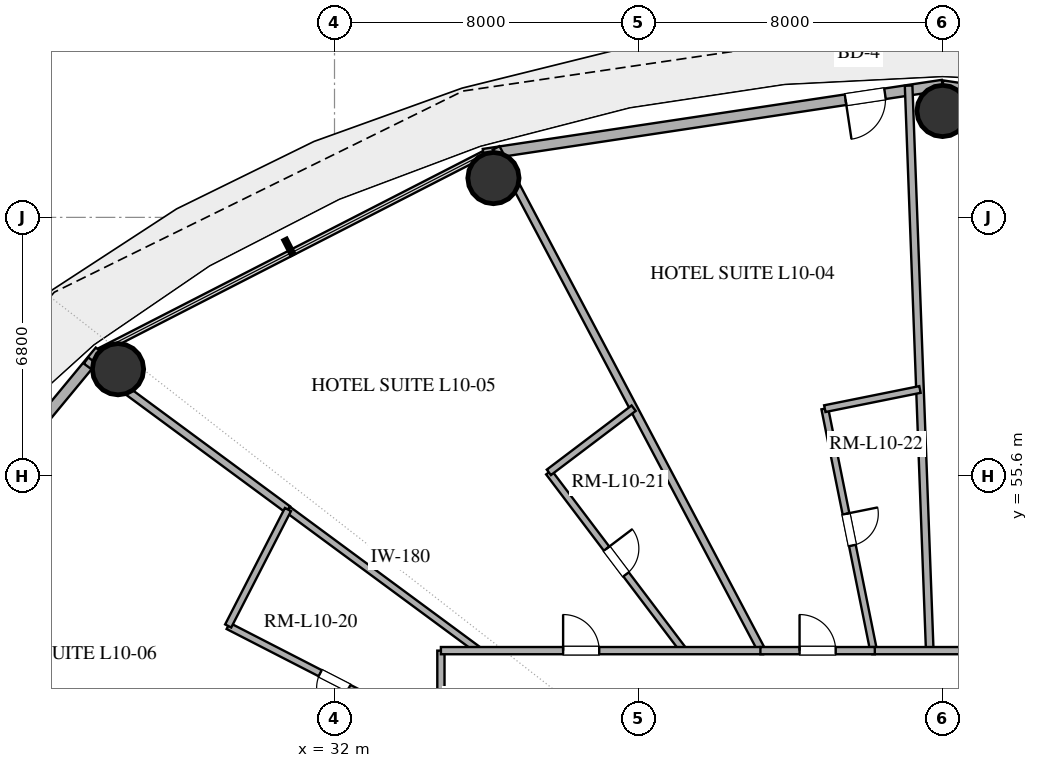
"""IFC4 building model, lengths in metres.
Left out: names, types, materials, properties, quantities, classifications, styles, units other than length and angle.
Written with IfcOpenShell. Run it as: python <this file> out.ifc"""

import sys

from ifc_helpers import new_model, si_unit, direction, frame, frame_2d, origin, origin_2d, place, context, subcontext, project, spatial, rectangle, hollow_circle, extrude, element, fill, save


model = new_model("IFC4")
c1 = context("Model", 3, precision=1e-05, world=origin(), true_north=direction((0.0, 1.0)))
c2 = subcontext(c1, "Body", "Model", "MODEL_VIEW")
j1 = project(units=[si_unit("LENGTHUNIT", "METRE"), si_unit("PLANEANGLEUNIT", "RADIAN")], contexts=[c1])
p1 = place(None, origin())
s1 = spatial("IfcSite", under=j1, at=p1, CompositionType="ELEMENT")
p2 = place(p1, origin())
s2 = spatial("IfcBuilding", under=s1, at=p2, CompositionType="ELEMENT")
p3 = place(p2, frame((0.0, 0.0, 46.2)))
s3 = spatial("IfcBuildingStorey", under=s2, at=p3, CompositionType="ELEMENT", Elevation=46.2)
for number, where, z_axis, x_axis in (
    (1, (48.0, 65.2, 0.0), (0.0, 0.0, 1.0), (1.0, 0.0, 0.0)),
    (2, (36.182, 63.434, 0.0), (0.0, 0.0, 1.0), (1.0, 0.0, 0.0)),
    (3, (26.303, 58.405, 0.0), (0.0, 0.0, 1.0), (1.0, 0.0, 0.0)),
):
    element("IfcColumn", number, at=place(p3, frame(where, z_axis=z_axis, x_axis=x_axis)), inside=s3, PredefinedType="COLUMN", context=c2, shape_type="SweptSolid", body=[
        extrude(hollow_circle(Radius=0.675, WallThickness=0.036, at=origin_2d()), origin(), (0.0, 0.0, 1.0), 3.38),
    ])
p4 = place(p3, frame((60.078, 64.062, 0.0), z_axis=(0.0, 0.0, 1.0), x_axis=(-0.988864835849, 0.148816452121, 0.0)))
e4 = element("IfcWall", 4, at=p4, inside=s3, PredefinedType="SOLIDWALL", context=c2, shape_type="SweptSolid", body=[
    extrude(rectangle(XDim=12.214, YDim=0.25, at=frame_2d((6.107, 0.0))), origin(), (0.0, 0.0, 1.0), 3.38),
])
p5 = place(p3, frame((48.0, 65.88, 0.0), z_axis=(0.0, 0.0, 1.0), x_axis=(-0.988864835849, -0.148816452121, 0.0)))
e5 = element("IfcWall", 5, at=p5, inside=s3, PredefinedType="SOLIDWALL", context=c2, shape_type="SweptSolid", body=[
    extrude(rectangle(XDim=12.214, YDim=0.28, at=frame_2d((6.107, 0.0))), origin(), (0.0, 0.0, 1.0), 3.38),
])
p6 = place(p5, frame((1.531, 0.0, 0.0)))
e6 = element("IfcOpeningElement", 6, at=p6, cuts=e5, PredefinedType="OPENING", context=c2, shape_type="SweptSolid", body=[
    extrude(rectangle(XDim=1.05, YDim=2.2, at=frame_2d((0.525, 1.1))), frame((0.0, 0.15, 0.0), z_axis=(0.0, -1.0, 0.0), x_axis=(1.0, 0.0, 0.0)), (0.0, 0.0, 1.0), 0.3),
])
p7 = place(p3, frame((25.826, 58.886, 0.0), z_axis=(0.0, 0.0, 1.0), x_axis=(-0.637296809613, -0.770618437657, 0.0)))
e7 = element("IfcWall", 7, at=p7, inside=s3, PredefinedType="SOLIDWALL", context=c2, shape_type="SweptSolid", body=[
    extrude(rectangle(XDim=10.053, YDim=0.28, at=frame_2d((5.027, 0.0))), origin(), (0.0, 0.0, 1.0), 3.38),
])
p8 = place(p7, frame((2.598, 0.0, 0.85)))
e8 = element("IfcOpeningElement", 8, at=p8, cuts=e7, PredefinedType="OPENING", context=c2, shape_type="SweptSolid", body=[
    extrude(rectangle(XDim=1.8, YDim=2.2, at=frame_2d((0.9, 1.1))), frame((0.0, 0.15, 0.0), z_axis=(0.0, -1.0, 0.0), x_axis=(1.0, 0.0, 0.0)), (0.0, 0.0, 1.0), 0.3),
])
p9 = place(p7, frame((5.53, 0.0, 0.85)))
e9 = element("IfcOpeningElement", 9, at=p9, cuts=e7, PredefinedType="OPENING", context=c2, shape_type="SweptSolid", body=[
    extrude(rectangle(XDim=1.8, YDim=2.2, at=frame_2d((0.9, 1.1))), frame((0.0, 0.15, 0.0), z_axis=(0.0, -1.0, 0.0), x_axis=(1.0, 0.0, 0.0)), (0.0, 0.0, 1.0), 0.3),
])
p10 = place(p3, frame((47.663, 51.0, 0.0), z_axis=(0.0, 0.0, 1.0), x_axis=(-0.037384345878, 0.999300961014, 0.0)))
e10 = element("IfcWall", 10, at=p10, inside=s3, PredefinedType="PARTITIONING", context=c2, shape_type="SweptSolid", body=[
    extrude(rectangle(XDim=14.877, YDim=0.2, at=frame_2d((7.438, 0.0))), origin(), (0.0, 0.0, 1.0), 2.74),
])
p11 = place(p3, frame((43.243, 51.0, 0.0), z_axis=(0.0, 0.0, 1.0), x_axis=(-0.467270516294, 0.884114395654, 0.0)))
e11 = element("IfcWall", 11, at=p11, inside=s3, PredefinedType="PARTITIONING", context=c2, shape_type="SweptSolid", body=[
    extrude(rectangle(XDim=14.96, YDim=0.2, at=frame_2d((7.48, 0.0))), origin(), (0.0, 0.0, 1.0), 2.74),
])
p12 = place(p3, frame((25.462, 58.634, 0.0), z_axis=(0.0, 0.0, 1.0), x_axis=(0.804616980297, -0.593794168898, 0.0)))
e12 = element("IfcWall", 12, at=p12, inside=s3, PredefinedType="PARTITIONING", context=c2, shape_type="SweptSolid", body=[
    extrude(rectangle(XDim=6.603, YDim=0.2, at=frame_2d((3.302, 0.0))), origin(), (0.0, 0.0, 1.0), 2.74),
])
p13 = place(p3, frame((44.902, 57.367, 0.0), z_axis=(0.0, 0.0, 1.0), x_axis=(0.197648412503, -0.980272974755, 0.0)))
e13 = element("IfcWall", 13, at=p13, inside=s3, PredefinedType="PLUMBINGWALL", context=c2, shape_type="SweptSolid", body=[
    extrude(rectangle(XDim=6.495, YDim=0.18, at=frame_2d((3.248, 0.0))), origin(), (0.0, 0.0, 1.0), 2.74),
])
p14 = place(p13, frame((2.823, 0.0, 0.0)))
e14 = element("IfcOpeningElement", 14, at=p14, cuts=e13, PredefinedType="OPENING", context=c2, shape_type="SweptSolid", body=[
    extrude(rectangle(XDim=0.85, YDim=2.1, at=frame_2d((0.425, 1.05))), frame((0.0, 0.1, 0.0), z_axis=(0.0, -1.0, 0.0), x_axis=(1.0, 0.0, 0.0)), (0.0, 0.0, 1.0), 0.2),
])
p15 = place(p3, frame((34.8, 48.776, 0.0), z_axis=(0.0, 0.0, 1.0), x_axis=(-0.889651376734, 0.456640370395, 0.0)))
e15 = element("IfcWall", 15, at=p15, inside=s3, PredefinedType="PLUMBINGWALL", context=c2, shape_type="SweptSolid", body=[
    extrude(rectangle(XDim=6.292, YDim=0.18, at=frame_2d((3.146, 0.0))), origin(), (0.0, 0.0, 1.0), 2.74),
])
p16 = place(p15, frame((2.721, 0.0, 0.0)))
e16 = element("IfcOpeningElement", 16, at=p16, cuts=e15, PredefinedType="OPENING", context=c2, shape_type="SweptSolid", body=[
    extrude(rectangle(XDim=0.85, YDim=2.1, at=frame_2d((0.425, 1.05))), frame((0.0, 0.1, 0.0), z_axis=(0.0, -1.0, 0.0), x_axis=(1.0, 0.0, 0.0)), (0.0, 0.0, 1.0), 0.2),
])
p17 = place(p3, frame((30.775, 54.713, 0.0), z_axis=(0.0, 0.0, 1.0), x_axis=(0.804582519588, -0.593840861825, 0.0)))
e17 = element("IfcWall", 17, at=p17, inside=s3, PredefinedType="PLUMBINGWALL", context=c2, shape_type="SweptSolid", body=[
    extrude(rectangle(XDim=6.252, YDim=0.18, at=frame_2d((3.126, 0.0))), origin(), (0.0, 0.0, 1.0), 2.74),
])
p18 = place(p3, frame((34.8, 36.017, 0.0), z_axis=(0.0, 0.0, 1.0), x_axis=(0.0, 1.0, 0.0)))
e18 = element("IfcWall", 18, at=p18, inside=s3, PredefinedType="PARTITIONING", context=c2, shape_type="SweptSolid", body=[
    extrude(rectangle(XDim=14.983, YDim=0.19, at=frame_2d((7.492, 0.0))), origin(), (0.0, 0.0, 1.0), 2.74),
])
p19 = place(p18, frame((4.963, 0.0, 0.0)))
e19 = element("IfcOpeningElement", 19, at=p19, cuts=e18, PredefinedType="OPENING", context=c2, shape_type="SweptSolid", body=[
    extrude(rectangle(XDim=1.0, YDim=2.2, at=frame_2d((0.5, 1.1))), frame((0.0, 0.105, 0.0), z_axis=(0.0, -1.0, 0.0), x_axis=(1.0, 0.0, 0.0)), (0.0, 0.0, 1.0), 0.21),
])
p20 = place(p18, frame((10.146, 0.0, 0.0)))
e20 = element("IfcOpeningElement", 20, at=p20, cuts=e18, PredefinedType="OPENING", context=c2, shape_type="SweptSolid", body=[
    extrude(rectangle(XDim=0.95, YDim=2.15, at=frame_2d((0.475, 1.075))), frame((0.0, 0.105, 0.0), z_axis=(0.0, -1.0, 0.0), x_axis=(1.0, 0.0, 0.0)), (0.0, 0.0, 1.0), 0.21),
])
p21 = place(p3, frame((37.64, 55.691, 0.0), z_axis=(0.0, 0.0, 1.0), x_axis=(0.603401299207, -0.797437691682, 0.0)))
e21 = element("IfcWall", 21, at=p21, inside=s3, PredefinedType="PLUMBINGWALL", context=c2, shape_type="SweptSolid", body=[
    extrude(rectangle(XDim=5.882, YDim=0.18, at=frame_2d((2.941, 0.0))), origin(), (0.0, 0.0, 1.0), 2.74),
])
p22 = place(p21, frame((2.516, 0.0, 0.0)))
e22 = element("IfcOpeningElement", 22, at=p22, cuts=e21, PredefinedType="OPENING", context=c2, shape_type="SweptSolid", body=[
    extrude(rectangle(XDim=0.85, YDim=2.1, at=frame_2d((0.425, 1.05))), frame((0.0, 0.1, 0.0), z_axis=(0.0, -1.0, 0.0), x_axis=(1.0, 0.0, 0.0)), (0.0, 0.0, 1.0), 0.2),
])
p23 = place(p3, frame((34.8, 51.0, 0.0), z_axis=(0.0, 0.0, 1.0), x_axis=(1.0, 0.0, 0.0)))
e23 = element("IfcWall", 23, at=p23, inside=s3, PredefinedType="PARTITIONING", context=c2, shape_type="SweptSolid", body=[
    extrude(rectangle(XDim=8.479, YDim=0.19, at=frame_2d((4.24, 0.0))), origin(), (0.0, 0.0, 1.0), 2.74),
])
p24 = place(p23, frame((3.216, 0.0, 0.0)))
e24 = element("IfcOpeningElement", 24, at=p24, cuts=e23, PredefinedType="OPENING", context=c2, shape_type="SweptSolid", body=[
    extrude(rectangle(XDim=0.95, YDim=2.15, at=frame_2d((0.475, 1.075))), frame((0.0, 0.105, 0.0), z_axis=(0.0, -1.0, 0.0), x_axis=(1.0, 0.0, 0.0)), (0.0, 0.0, 1.0), 0.21),
])
p25 = place(p3, frame((46.153, 51.0, 0.0), z_axis=(0.0, 0.0, 1.0), x_axis=(1.0, 0.0, 0.0)))
e25 = element("IfcWall", 25, at=p25, inside=s3, PredefinedType="PARTITIONING", context=c2, shape_type="SweptSolid", body=[
    extrude(rectangle(XDim=15.047, YDim=0.19, at=frame_2d((7.524, 0.0))), origin(), (0.0, 0.0, 1.0), 2.74),
])
p26 = place(p25, frame((3.144, 0.0, 0.0)))
e26 = element("IfcOpeningElement", 26, at=p26, cuts=e25, PredefinedType="OPENING", context=c2, shape_type="SweptSolid", body=[
    extrude(rectangle(XDim=1.0, YDim=2.2, at=frame_2d((0.5, 1.1))), frame((0.0, 0.105, 0.0), z_axis=(0.0, -1.0, 0.0), x_axis=(1.0, 0.0, 0.0)), (0.0, 0.0, 1.0), 0.21),
])
p27 = place(p25, frame((7.119, 0.0, 0.0)))
e27 = element("IfcOpeningElement", 27, at=p27, cuts=e25, PredefinedType="OPENING", context=c2, shape_type="SweptSolid", body=[
    extrude(rectangle(XDim=0.95, YDim=2.15, at=frame_2d((0.475, 1.075))), frame((0.0, 0.105, 0.0), z_axis=(0.0, -1.0, 0.0), x_axis=(1.0, 0.0, 0.0)), (0.0, 0.0, 1.0), 0.21),
])
p28 = place(p3, frame((29.202, 51.649, 0.0), z_axis=(0.0, 0.0, 1.0), x_axis=(0.456659133546, 0.889641745732, 0.0)))
e28 = element("IfcWall", 28, at=p28, inside=s3, PredefinedType="PLUMBINGWALL", context=c2, shape_type="SweptSolid", body=[
    extrude(rectangle(XDim=3.444, YDim=0.18, at=frame_2d((1.722, 0.0))), origin(), (0.0, 0.0, 1.0), 2.74),
])
p29 = place(p3, frame((43.207, 51.0, 0.0), z_axis=(0.0, 0.0, 1.0), x_axis=(1.0, 0.0, 0.0)))
e29 = element("IfcWall", 29, at=p29, inside=s3, PredefinedType="PARTITIONING", context=c2, shape_type="SweptSolid", body=[
    extrude(rectangle(XDim=3.011, YDim=0.19, at=frame_2d((1.505, 0.0))), origin(), (0.0, 0.0, 1.0), 2.74),
])
p30 = place(p29, frame((1.03, 0.0, 0.0)))
e30 = element("IfcOpeningElement", 30, at=p30, cuts=e29, PredefinedType="OPENING", context=c2, shape_type="SweptSolid", body=[
    extrude(rectangle(XDim=0.95, YDim=2.15, at=frame_2d((0.475, 1.075))), frame((0.0, 0.105, 0.0), z_axis=(0.0, -1.0, 0.0), x_axis=(1.0, 0.0, 0.0)), (0.0, 0.0, 1.0), 0.21),
])
p31 = place(p3, frame((39.872, 57.379, 0.0), z_axis=(0.0, 0.0, 1.0), x_axis=(-0.797438154909, -0.603400687019, 0.0)))
e31 = element("IfcWall", 31, at=p31, inside=s3, PredefinedType="PLUMBINGWALL", context=c2, shape_type="SweptSolid", body=[
    extrude(rectangle(XDim=2.798, YDim=0.18, at=frame_2d((1.399, 0.0))), origin(), (0.0, 0.0, 1.0), 2.74),
])
p32 = place(p3, frame((47.406, 57.872, 0.0), z_axis=(0.0, 0.0, 1.0), x_axis=(-0.980278128955, -0.1976228476, 0.0)))
e32 = element("IfcWall", 32, at=p32, inside=s3, PredefinedType="PLUMBINGWALL", context=c2, shape_type="SweptSolid", body=[
    extrude(rectangle(XDim=2.555, YDim=0.18, at=frame_2d((1.277, 0.0))), origin(), (0.0, 0.0, 1.0), 2.74),
])
p33 = place(p6, origin())
e33 = element("IfcDoor", 33, at=p33, inside=s3, OperationType="SINGLE_SWING_RIGHT", PredefinedType="DOOR", context=c2, shape_type="SweptSolid", body=[
    extrude(rectangle(XDim=1.05, YDim=2.2, at=frame_2d((0.525, 1.1))), frame((0.0, 0.025, 0.0), z_axis=(0.0, -1.0, 0.0), x_axis=(1.0, 0.0, 0.0)), (0.0, 0.0, 1.0), 0.05),
])
fill(e6, e33)
p34 = place(p14, origin())
e34 = element("IfcDoor", 34, at=p34, inside=s3, OperationType="SINGLE_SWING_LEFT", PredefinedType="DOOR", context=c2, shape_type="SweptSolid", body=[
    extrude(rectangle(XDim=0.85, YDim=2.1, at=frame_2d((0.425, 1.05))), frame((0.0, 0.025, 0.0), z_axis=(0.0, -1.0, 0.0), x_axis=(1.0, 0.0, 0.0)), (0.0, 0.0, 1.0), 0.05),
])
fill(e14, e34)
p35 = place(p16, origin())
e35 = element("IfcDoor", 35, at=p35, inside=s3, OperationType="SINGLE_SWING_LEFT", PredefinedType="DOOR", context=c2, shape_type="SweptSolid", body=[
    extrude(rectangle(XDim=0.85, YDim=2.1, at=frame_2d((0.425, 1.05))), frame((0.0, 0.025, 0.0), z_axis=(0.0, -1.0, 0.0), x_axis=(1.0, 0.0, 0.0)), (0.0, 0.0, 1.0), 0.05),
])
fill(e16, e35)
p36 = place(p22, origin())
e36 = element("IfcDoor", 36, at=p36, inside=s3, OperationType="SINGLE_SWING_LEFT", PredefinedType="DOOR", context=c2, shape_type="SweptSolid", body=[
    extrude(rectangle(XDim=0.85, YDim=2.1, at=frame_2d((0.425, 1.05))), frame((0.0, 0.025, 0.0), z_axis=(0.0, -1.0, 0.0), x_axis=(1.0, 0.0, 0.0)), (0.0, 0.0, 1.0), 0.05),
])
fill(e22, e36)
p37 = place(p24, origin())
e37 = element("IfcDoor", 37, at=p37, inside=s3, OperationType="SINGLE_SWING_LEFT", PredefinedType="DOOR", context=c2, shape_type="SweptSolid", body=[
    extrude(rectangle(XDim=0.95, YDim=2.15, at=frame_2d((0.475, 1.075))), frame((0.0, 0.025, 0.0), z_axis=(0.0, -1.0, 0.0), x_axis=(1.0, 0.0, 0.0)), (0.0, 0.0, 1.0), 0.05),
])
fill(e24, e37)
p38 = place(p30, origin())
e38 = element("IfcDoor", 38, at=p38, inside=s3, OperationType="SINGLE_SWING_LEFT", PredefinedType="DOOR", context=c2, shape_type="SweptSolid", body=[
    extrude(rectangle(XDim=0.95, YDim=2.15, at=frame_2d((0.475, 1.075))), frame((0.0, 0.025, 0.0), z_axis=(0.0, -1.0, 0.0), x_axis=(1.0, 0.0, 0.0)), (0.0, 0.0, 1.0), 0.05),
])
fill(e30, e38)
save(model, sys.argv[1])
